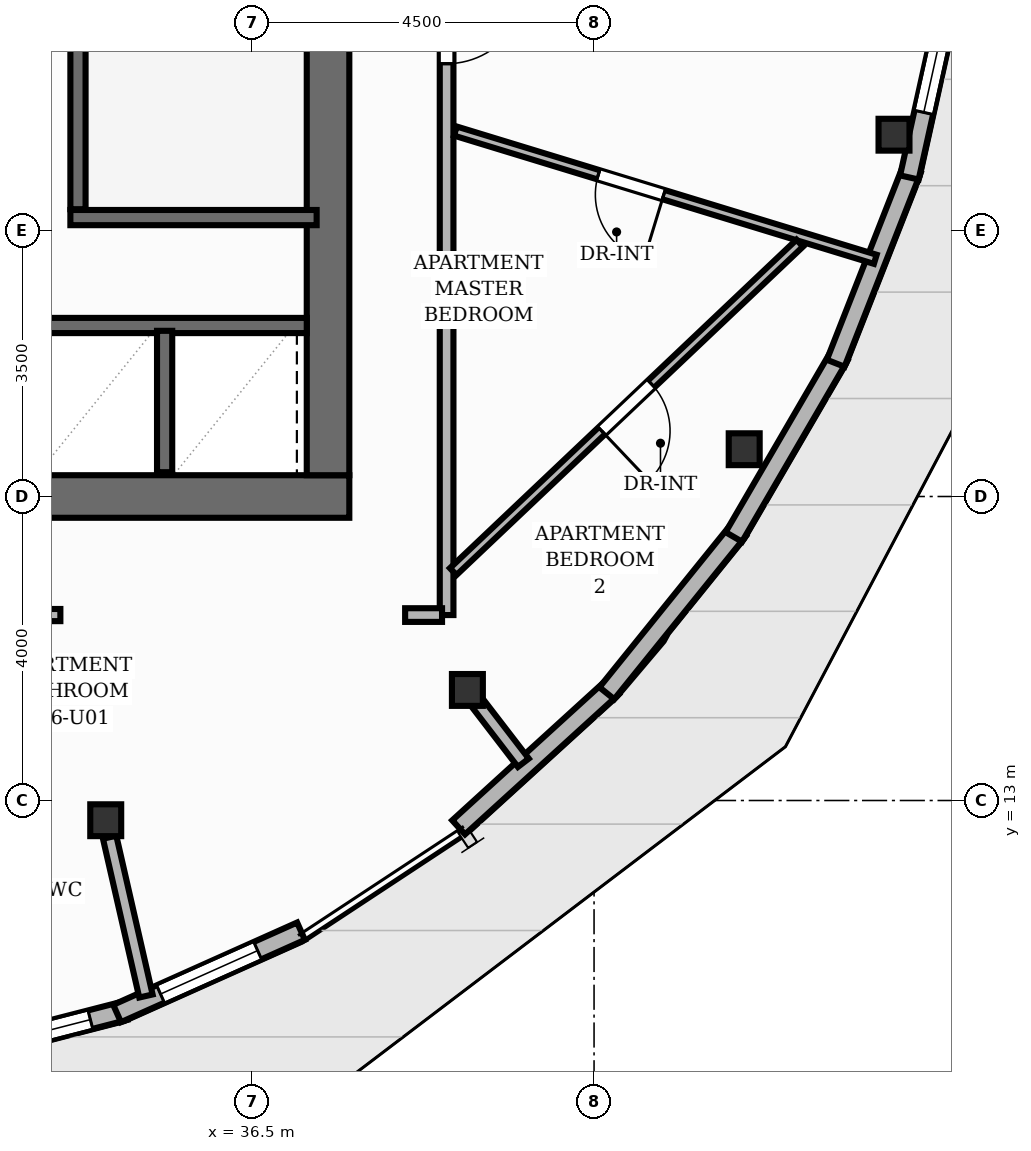
"""IFC4 building model, lengths in metres.
Left out: names, types, materials, properties, quantities, classifications, styles, units other than length and angle.
Written with IfcOpenShell. Run it as: python <this file> out.ifc"""

import sys

from ifc_helpers import new_model, si_unit, direction, frame, frame_2d, origin, origin_2d, place, context, subcontext, project, spatial, rectangle, i_section, extrude, element, fill, save


model = new_model("IFC4")
c1 = context("Model", 3, precision=1e-05, world=origin(), true_north=direction((0.0, 1.0)))
c2 = subcontext(c1, "Body", "Model", "MODEL_VIEW")
j1 = project(units=[si_unit("LENGTHUNIT", "METRE"), si_unit("PLANEANGLEUNIT", "RADIAN")], contexts=[c1])
p1 = place(None, origin())
s1 = spatial("IfcSite", under=j1, at=p1, CompositionType="ELEMENT")
p2 = place(p1, origin())
s2 = spatial("IfcBuilding", under=s1, at=p2, CompositionType="ELEMENT")
p3 = place(p2, frame((0.0, 0.0, 220.64)))
s3 = spatial("IfcBuildingStorey", under=s2, at=p3, CompositionType="ELEMENT", Elevation=220.64)
p4 = place(p3, frame((26.22, 17.0, 0.0), z_axis=(0.0, 0.0, 1.0), x_axis=(1.0, 0.0, 0.0)))
e1 = element("IfcWall", 1, at=p4, inside=s3, PredefinedType="SHEAR", context=c2, shape_type="SweptSolid", body=[
    extrude(rectangle(XDim=11.56, YDim=0.56, at=frame_2d((5.78, 0.0))), origin(), (0.0, 0.0, 1.0), 3.2),
])
p5 = place(p4, frame((2.28, 0.0, 0.0)))
e2 = element("IfcOpeningElement", 2, at=p5, cuts=e1, PredefinedType="OPENING", context=c2, shape_type="SweptSolid", body=[
    extrude(rectangle(XDim=1.1, YDim=2.15, at=frame_2d((0.55, 1.075))), frame((0.0, 0.29, 0.0), z_axis=(0.0, -1.0, 0.0), x_axis=(1.0, 0.0, 0.0)), (0.0, 0.0, 1.0), 0.58),
])
p6 = place(p4, frame((5.83, 0.0, 0.0)))
e3 = element("IfcOpeningElement", 3, at=p6, cuts=e1, PredefinedType="OPENING", context=c2, shape_type="SweptSolid", body=[
    extrude(rectangle(XDim=0.9, YDim=2.1, at=frame_2d((0.45, 1.05))), frame((0.0, 0.29, 0.0), z_axis=(0.0, -1.0, 0.0), x_axis=(1.0, 0.0, 0.0)), (0.0, 0.0, 1.0), 0.58),
])
p7 = place(p3, frame((37.5, 17.28, 0.0), z_axis=(0.0, 0.0, 1.0), x_axis=(0.0, 1.0, 0.0)))
e4 = element("IfcWall", 4, at=p7, inside=s3, PredefinedType="SHEAR", context=c2, shape_type="SweptSolid", body=[
    extrude(rectangle(XDim=13.44, YDim=0.56, at=frame_2d((6.72, 0.0))), origin(), (0.0, 0.0, 1.0), 3.2),
])
for number, where, z_axis, x_axis in (
    (5, (34.575, 12.74, 0.0), (0.0, 0.0, 1.0), (1.0, 0.0, 0.0)),
    (6, (39.333, 14.455, 0.0), (0.0, 0.0, 1.0), (1.0, 0.0, 0.0)),
    (7, (42.975, 17.622, 0.0), (0.0, 0.0, 1.0), (1.0, 0.0, 0.0)),
    (8, (44.946, 21.76, 0.0), (0.0, 0.0, 1.0), (1.0, 0.0, 0.0)),
):
    element("IfcColumn", number, at=place(p3, frame(where, z_axis=z_axis, x_axis=x_axis)), inside=s3, PredefinedType="COLUMN", context=c2, shape_type="SweptSolid", body=[
        extrude(i_section(OverallWidth=0.407, OverallDepth=0.419, WebThickness=0.031, FlangeThickness=0.049, at=origin_2d()), origin(), (0.0, 0.0, 1.0), 3.2),
    ])
p8 = place(p3, frame((34.829, 10.234, 0.0), z_axis=(0.0, 0.0, 1.0), x_axis=(-0.968423445169, -0.249311112562, 0.0)))
e9 = element("IfcWall", 9, at=p8, inside=s3, PredefinedType="SOLIDWALL", context=c2, shape_type="SweptSolid", body=[
    extrude(rectangle(XDim=2.592, YDim=0.25, at=frame_2d((1.296, 0.0))), origin(), (0.0, 0.0, 1.0), 2.96),
])
p9 = place(p8, frame((0.471, 0.0, 0.85)))
e10 = element("IfcOpeningElement", 10, at=p9, cuts=e9, PredefinedType="OPENING", context=c2, shape_type="SweptSolid", body=[
    extrude(rectangle(XDim=1.65, YDim=1.55, at=frame_2d((0.825, 0.775))), frame((0.0, 0.135, 0.0), z_axis=(0.0, -1.0, 0.0), x_axis=(1.0, 0.0, 0.0)), (0.0, 0.0, 1.0), 0.27),
])
p10 = place(p3, frame((37.145, 11.281, 0.0), z_axis=(0.0, 0.0, 1.0), x_axis=(-0.912779399898, -0.408452894617, 0.0)))
e11 = element("IfcWall", 11, at=p10, inside=s3, PredefinedType="SOLIDWALL", context=c2, shape_type="SweptSolid", body=[
    extrude(rectangle(XDim=2.651, YDim=0.25, at=frame_2d((1.325, 0.0))), origin(), (0.0, 0.0, 1.0), 2.96),
])
p11 = place(p10, frame((0.625, 0.0, 0.85)))
e12 = element("IfcOpeningElement", 12, at=p11, cuts=e11, PredefinedType="OPENING", context=c2, shape_type="SweptSolid", body=[
    extrude(rectangle(XDim=1.4, YDim=1.52, at=frame_2d((0.7, 0.76))), frame((0.0, 0.135, 0.0), z_axis=(0.0, -1.0, 0.0), x_axis=(1.0, 0.0, 0.0)), (0.0, 0.0, 1.0), 0.27),
])
p12 = place(p3, frame((41.243, 14.49, 0.0), z_axis=(0.0, 0.0, 1.0), x_axis=(-0.739366950434, -0.673302690182, 0.0)))
e13 = element("IfcWall", 13, at=p12, inside=s3, PredefinedType="SOLIDWALL", context=c2, shape_type="SweptSolid", body=[
    extrude(rectangle(XDim=2.738, YDim=0.25, at=frame_2d((1.369, 0.0))), origin(), (0.0, 0.0, 1.0), 2.96),
])
p13 = place(p3, frame((42.9, 16.558, 0.0), z_axis=(0.0, 0.0, 1.0), x_axis=(-0.628046541479, -0.778175778174, 0.0)))
e14 = element("IfcWall", 14, at=p13, inside=s3, PredefinedType="SOLIDWALL", context=c2, shape_type="SweptSolid", body=[
    extrude(rectangle(XDim=2.758, YDim=0.25, at=frame_2d((1.379, 0.0))), origin(), (0.0, 0.0, 1.0), 2.96),
])
p14 = place(p3, frame((44.227, 18.851, 0.0), z_axis=(0.0, 0.0, 1.0), x_axis=(-0.503177339128, -0.864183178144, 0.0)))
e15 = element("IfcWall", 15, at=p14, inside=s3, PredefinedType="SOLIDWALL", context=c2, shape_type="SweptSolid", body=[
    extrude(rectangle(XDim=2.758, YDim=0.25, at=frame_2d((1.379, 0.0))), origin(), (0.0, 0.0, 1.0), 2.96),
])
p15 = place(p3, frame((45.18, 21.302, 0.0), z_axis=(0.0, 0.0, 1.0), x_axis=(-0.365588934877, -0.930776412838, 0.0)))
e16 = element("IfcWall", 16, at=p15, inside=s3, PredefinedType="SOLIDWALL", context=c2, shape_type="SweptSolid", body=[
    extrude(rectangle(XDim=2.739, YDim=0.25, at=frame_2d((1.369, 0.0))), origin(), (0.0, 0.0, 1.0), 2.577),
])
p16 = place(p3, frame((45.733, 23.836, 0.0), z_axis=(0.0, 0.0, 1.0), x_axis=(-0.21633718885, -0.976318708579, 0.0)))
e17 = element("IfcWall", 17, at=p16, inside=s3, PredefinedType="SOLIDWALL", context=c2, shape_type="SweptSolid", body=[
    extrude(rectangle(XDim=2.702, YDim=0.25, at=frame_2d((1.351, 0.0))), origin(), (0.0, 0.0, 1.0), 2.577),
])
p17 = place(p16, frame((0.175, 0.0, 0.85)))
e18 = element("IfcOpeningElement", 18, at=p17, cuts=e17, PredefinedType="OPENING", context=c2, shape_type="SweptSolid", body=[
    extrude(rectangle(XDim=1.65, YDim=1.55, at=frame_2d((0.825, 0.775))), frame((0.0, 0.135, 0.0), z_axis=(0.0, -1.0, 0.0), x_axis=(1.0, 0.0, 0.0)), (0.0, 0.0, 1.0), 0.27),
])
p18 = place(p3, frame((34.21, 20.78, 0.0), z_axis=(0.0, 0.0, 1.0), x_axis=(0.0, 1.0, 0.0)))
e19 = element("IfcWall", 19, at=p18, inside=s3, PredefinedType="SHEAR", context=c2, shape_type="SweptSolid", body=[
    extrude(rectangle(XDim=6.44, YDim=0.2, at=frame_2d((3.22, 0.0))), origin(), (0.0, 0.0, 1.0), 3.2),
])
p19 = place(p3, frame((34.11, 20.67, 0.0), z_axis=(0.0, 0.0, 1.0), x_axis=(1.0, 0.0, 0.0)))
e20 = element("IfcWall", 20, at=p19, inside=s3, PredefinedType="SHEAR", context=c2, shape_type="SweptSolid", body=[
    extrude(rectangle(XDim=3.24, YDim=0.2, at=frame_2d((1.62, 0.0))), origin(), (0.0, 0.0, 1.0), 3.2),
])
p20 = place(p3, frame((33.5, 19.25, 0.0), z_axis=(0.0, 0.0, 1.0), x_axis=(1.0, 0.0, 0.0)))
e21 = element("IfcWall", 21, at=p20, inside=s3, PredefinedType="SHEAR", context=c2, shape_type="SweptSolid", body=[
    extrude(rectangle(XDim=3.72, YDim=0.2, at=frame_2d((1.86, 0.0))), origin(), (0.0, 0.0, 1.0), 3.2),
])
p21 = place(p3, frame((35.35, 17.32, 0.0), z_axis=(0.0, 0.0, 1.0), x_axis=(0.0, 1.0, 0.0)))
e22 = element("IfcWall", 22, at=p21, inside=s3, PredefinedType="SHEAR", context=c2, shape_type="SweptSolid", body=[
    extrude(rectangle(XDim=1.86, YDim=0.2, at=frame_2d((0.93, 0.0))), origin(), (0.0, 0.0, 1.0), 3.2),
])
p22 = place(p3, frame((34.626, 12.517, 0.0), z_axis=(0.0, 0.0, 1.0), x_axis=(0.222945438732, -0.974830924493, 0.0)))
e23 = element("IfcWall", 23, at=p22, inside=s3, PredefinedType="PARTITIONING", context=c2, shape_type="SweptSolid", body=[
    extrude(rectangle(XDim=2.143, YDim=0.18, at=frame_2d((1.072, 0.0))), origin(), (0.0, 0.0, 1.0), 2.404),
])
p23 = place(p3, frame((39.473, 14.273, 0.0), z_axis=(0.0, 0.0, 1.0), x_axis=(0.60918017505, -0.793031849503, 0.0)))
e24 = element("IfcWall", 24, at=p23, inside=s3, PredefinedType="PARTITIONING", context=c2, shape_type="SweptSolid", body=[
    extrude(rectangle(XDim=0.979, YDim=0.18, at=frame_2d((0.489, 0.0))), origin(), (0.0, 0.0, 1.0), 2.404),
])
p24 = place(p3, frame((33.978, 15.44, 0.0), z_axis=(0.0, 0.0, 1.0), x_axis=(-1.0, 0.0, 0.0)))
e25 = element("IfcWall", 25, at=p24, inside=s3, PredefinedType="PLUMBINGWALL", context=c2, shape_type="SweptSolid", body=[
    extrude(rectangle(XDim=0.778, YDim=0.16, at=frame_2d((0.389, 0.0))), origin(), (0.0, 0.0, 1.0), 2.955),
])
p25 = place(p3, frame((39.06, 32.56, 0.0), z_axis=(0.0, 0.0, 1.0), x_axis=(0.0, -1.0, 0.0)))
e26 = element("IfcWall", 26, at=p25, inside=s3, PredefinedType="PARTITIONING", context=c2, shape_type="SweptSolid", body=[
    extrude(rectangle(XDim=17.12, YDim=0.18, at=frame_2d((8.56, 0.0))), origin(), (0.0, 0.0, 1.0), 2.955),
])
p26 = place(p25, frame((8.815, 0.0, 0.0)))
e27 = element("IfcOpeningElement", 27, at=p26, cuts=e26, PredefinedType="OPENING", context=c2, shape_type="SweptSolid", body=[
    extrude(rectangle(XDim=1.05, YDim=2.15, at=frame_2d((0.525, 1.075))), frame((0.0, 0.1, 0.0), z_axis=(0.0, -1.0, 0.0), x_axis=(1.0, 0.0, 0.0)), (0.0, 0.0, 1.0), 0.2),
])
p27 = place(p3, frame((39.0, 15.44, 0.0), z_axis=(0.0, 0.0, 1.0), x_axis=(-1.0, 0.0, 0.0)))
e28 = element("IfcWall", 28, at=p27, inside=s3, PredefinedType="PARTITIONING", context=c2, shape_type="SweptSolid", body=[
    extrude(rectangle(XDim=0.486, YDim=0.18, at=frame_2d((0.243, 0.0))), origin(), (0.0, 0.0, 1.0), 2.955),
])
p28 = place(p3, frame((44.7, 20.121, 0.0), z_axis=(0.0, 0.0, 1.0), x_axis=(-0.956379122361, 0.29212835246, 0.0)))
e29 = element("IfcWall", 29, at=p28, inside=s3, PredefinedType="PARTITIONING", context=c2, shape_type="SweptSolid", body=[
    extrude(rectangle(XDim=5.777, YDim=0.125, at=frame_2d((2.889, 0.0))), origin(), (0.0, 0.0, 1.0), 2.692),
])
p29 = place(p28, frame((2.91, 0.0, 0.0)))
e30 = element("IfcOpeningElement", 30, at=p29, cuts=e29, PredefinedType="OPENING", context=c2, shape_type="SweptSolid", body=[
    extrude(rectangle(XDim=0.9, YDim=2.1, at=frame_2d((0.45, 1.05))), frame((0.0, 0.073, 0.0), z_axis=(0.0, -1.0, 0.0), x_axis=(1.0, 0.0, 0.0)), (0.0, 0.0, 1.0), 0.145),
])
p30 = place(p3, frame((43.707, 20.333, 0.0), z_axis=(0.0, 0.0, 1.0), x_axis=(-0.725799476315, -0.687906330965, 0.0)))
e31 = element("IfcWall", 31, at=p30, inside=s3, PredefinedType="PARTITIONING", context=c2, shape_type="SweptSolid", body=[
    extrude(rectangle(XDim=6.282, YDim=0.125, at=frame_2d((3.141, 0.0))), origin(), (0.0, 0.0, 1.0), 2.955),
])
p31 = place(p30, frame((2.691, 0.0, 0.0)))
e32 = element("IfcOpeningElement", 32, at=p31, cuts=e31, PredefinedType="OPENING", context=c2, shape_type="SweptSolid", body=[
    extrude(rectangle(XDim=0.9, YDim=2.1, at=frame_2d((0.45, 1.05))), frame((0.0, 0.073, 0.0), z_axis=(0.0, -1.0, 0.0), x_axis=(1.0, 0.0, 0.0)), (0.0, 0.0, 1.0), 0.145),
])
p32 = place(p9, origin())
e33 = element("IfcWindow", 33, at=p32, inside=s3, PartitioningType="SINGLE_PANEL", PredefinedType="WINDOW", context=c2, shape_type="SweptSolid", body=[
    extrude(rectangle(XDim=1.65, YDim=1.55, at=frame_2d((0.825, 0.775))), frame((0.0, 0.03, 0.0), z_axis=(0.0, -1.0, 0.0), x_axis=(1.0, 0.0, 0.0)), (0.0, 0.0, 1.0), 0.06),
])
fill(e10, e33)
p33 = place(p11, origin())
e34 = element("IfcWindow", 34, at=p33, inside=s3, PartitioningType="SINGLE_PANEL", PredefinedType="WINDOW", context=c2, shape_type="SweptSolid", body=[
    extrude(rectangle(XDim=1.4, YDim=1.52, at=frame_2d((0.7, 0.76))), frame((0.0, 0.03, 0.0), z_axis=(0.0, -1.0, 0.0), x_axis=(1.0, 0.0, 0.0)), (0.0, 0.0, 1.0), 0.06),
])
fill(e12, e34)
p34 = place(p17, origin())
e35 = element("IfcWindow", 35, at=p34, inside=s3, PartitioningType="SINGLE_PANEL", PredefinedType="WINDOW", context=c2, shape_type="SweptSolid", body=[
    extrude(rectangle(XDim=1.65, YDim=1.55, at=frame_2d((0.825, 0.775))), frame((0.0, 0.03, 0.0), z_axis=(0.0, -1.0, 0.0), x_axis=(1.0, 0.0, 0.0)), (0.0, 0.0, 1.0), 0.06),
])
fill(e18, e35)
p35 = place(p26, origin())
e36 = element("IfcDoor", 36, at=p35, inside=s3, OperationType="SINGLE_SWING_LEFT", PredefinedType="DOOR", context=c2, shape_type="SweptSolid", body=[
    extrude(rectangle(XDim=1.05, YDim=2.15, at=frame_2d((0.525, 1.075))), frame((0.0, 0.025, 0.0), z_axis=(0.0, -1.0, 0.0), x_axis=(1.0, 0.0, 0.0)), (0.0, 0.0, 1.0), 0.05),
])
fill(e27, e36)
p36 = place(p29, origin())
e37 = element("IfcDoor", 37, at=p36, inside=s3, OperationType="SINGLE_SWING_LEFT", PredefinedType="DOOR", context=c2, shape_type="SweptSolid", body=[
    extrude(rectangle(XDim=0.9, YDim=2.1, at=frame_2d((0.45, 1.05))), frame((0.0, 0.025, 0.0), z_axis=(0.0, -1.0, 0.0), x_axis=(1.0, 0.0, 0.0)), (0.0, 0.0, 1.0), 0.05),
])
fill(e30, e37)
p37 = place(p31, origin())
e38 = element("IfcDoor", 38, at=p37, inside=s3, OperationType="SINGLE_SWING_RIGHT", PredefinedType="DOOR", context=c2, shape_type="SweptSolid", body=[
    extrude(rectangle(XDim=0.9, YDim=2.1, at=frame_2d((0.45, 1.05))), frame((0.0, 0.025, 0.0), z_axis=(0.0, -1.0, 0.0), x_axis=(1.0, 0.0, 0.0)), (0.0, 0.0, 1.0), 0.05),
])
fill(e32, e38)
save(model, sys.argv[1])
